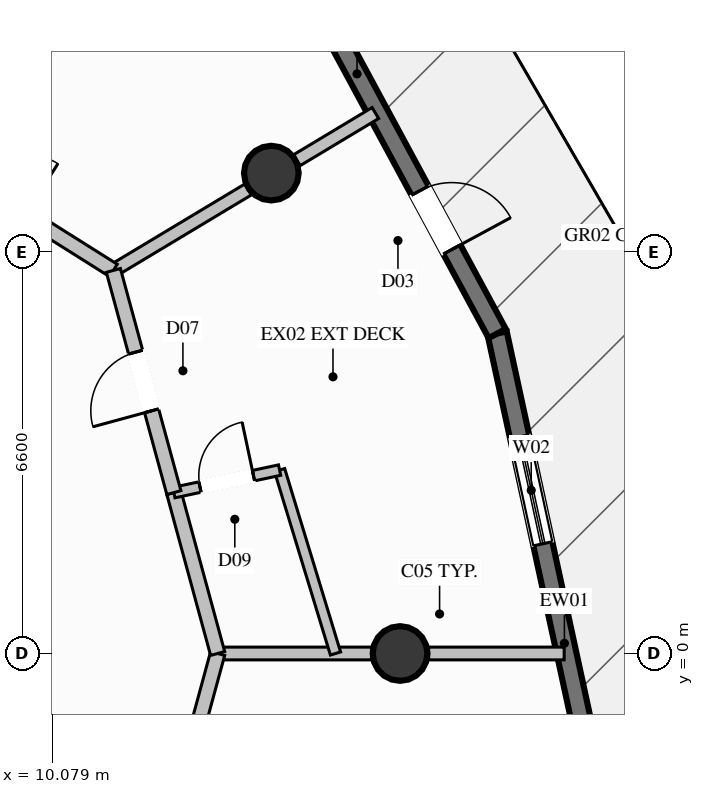
"""IFC4 building model, lengths in metres.
Left out: names, types, materials, properties, quantities, classifications, styles, units other than length and angle.
Written with IfcOpenShell. Run it as: python <this file> out.ifc"""

import sys

from ifc_helpers import new_model, si_unit, direction, frame, frame_2d, origin, origin_2d, place, context, subcontext, project, spatial, rectangle, circle, extrude, element, fill, save


model = new_model("IFC4")
c1 = context("Model", 3, precision=1e-05, world=origin(), true_north=direction((0.0, 1.0)))
c2 = subcontext(c1, "Body", "Model", "MODEL_VIEW")
j1 = project(units=[si_unit("LENGTHUNIT", "METRE"), si_unit("PLANEANGLEUNIT", "RADIAN")], contexts=[c1])
p1 = place(None, origin())
s1 = spatial("IfcSite", under=j1, at=p1, CompositionType="ELEMENT")
p2 = place(p1, origin())
s2 = spatial("IfcBuilding", under=s1, at=p2, CompositionType="ELEMENT")
p3 = place(p2, frame((0.0, 0.0, 180.4)))
s3 = spatial("IfcBuildingStorey", under=s2, at=p3, CompositionType="ELEMENT", Elevation=180.4)
for number, where, z_axis, x_axis in (
    (1, (15.8, 0.0, 0.0), (0.0, 0.0, 1.0), (1.0, 0.0, 0.0)),
    (2, (13.683, 7.9, 0.0), (0.0, 0.0, 1.0), (1.0, 0.0, 0.0)),
):
    element("IfcColumn", number, at=place(p3, frame(where, z_axis=z_axis, x_axis=x_axis)), inside=s3, PredefinedType="COLUMN", context=c2, shape_type="SweptSolid", body=[
        extrude(circle(Radius=0.45, at=origin_2d()), origin(), (0.0, 0.0, 1.0), 3.6),
    ])
p4 = place(p3, frame((17.398, 5.262, 0.0), z_axis=(0.0, 0.0, 1.0), x_axis=(0.211992849193, -0.977271217161, 0.0)))
e3 = element("IfcWall", 3, at=p4, inside=s3, PredefinedType="SOLIDWALL", context=c2, shape_type="SweptSolid", body=[
    extrude(rectangle(XDim=6.637, YDim=0.32, at=frame_2d((3.318, 0.0))), origin(), (0.0, 0.0, 1.0), 3.36),
])
p5 = place(p4, frame((1.738, 0.0, 0.35)))
e4 = element("IfcOpeningElement", 4, at=p5, cuts=e3, PredefinedType="OPENING", context=c2, shape_type="SweptSolid", body=[
    extrude(rectangle(XDim=1.8, YDim=2.6, at=frame_2d((0.9, 1.3))), frame((0.0, 0.17, 0.0), z_axis=(0.0, -1.0, 0.0), x_axis=(1.0, 0.0, 0.0)), (0.0, 0.0, 1.0), 0.34),
])
p6 = place(p3, frame((14.174, 11.232, 0.0), z_axis=(0.0, 0.0, 1.0), x_axis=(0.475159501302, -0.879899680829, 0.0)))
e5 = element("IfcWall", 5, at=p6, inside=s3, PredefinedType="SOLIDWALL", context=c2, shape_type="SweptSolid", body=[
    extrude(rectangle(XDim=6.785, YDim=0.32, at=frame_2d((3.393, 0.0))), origin(), (0.0, 0.0, 1.0), 3.36),
])
p7 = place(p6, frame((4.114, 0.0, 0.0)))
e6 = element("IfcOpeningElement", 6, at=p7, cuts=e5, PredefinedType="OPENING", context=c2, shape_type="SweptSolid", body=[
    extrude(rectangle(XDim=1.1, YDim=2.2, at=frame_2d((0.55, 1.1))), frame((0.0, 0.17, 0.0), z_axis=(0.0, -1.0, 0.0), x_axis=(1.0, 0.0, 0.0)), (0.0, 0.0, 1.0), 0.34),
])
p8 = place(p3, frame((12.8, 0.0, 0.0), z_axis=(0.0, 0.0, 1.0), x_axis=(1.0, 0.0, 0.0)))
e7 = element("IfcWall", 7, at=p8, inside=s3, PredefinedType="PARTITIONING", context=c2, shape_type="SweptSolid", body=[
    extrude(rectangle(XDim=2.53, YDim=0.21, at=frame_2d((1.265, 0.0))), origin(), (0.0, 0.0, 1.0), 3.36),
])
p9 = place(p3, frame((16.27, 0.0, 0.0), z_axis=(0.0, 0.0, 1.0), x_axis=(1.0, 0.0, 0.0)))
e8 = element("IfcWall", 8, at=p9, inside=s3, PredefinedType="PARTITIONING", context=c2, shape_type="SweptSolid", body=[
    extrude(rectangle(XDim=2.229, YDim=0.21, at=frame_2d((1.115, 0.0))), origin(), (0.0, 0.0, 1.0), 3.36),
])
p10 = place(p3, frame((11.085, 6.3, 0.0), z_axis=(0.0, 0.0, 1.0), x_axis=(0.857259301733, 0.514884928497, 0.0)))
e9 = element("IfcWall", 9, at=p10, inside=s3, PredefinedType="PARTITIONING", context=c2, shape_type="SweptSolid", body=[
    extrude(rectangle(XDim=2.583, YDim=0.21, at=frame_2d((1.292, 0.0))), origin(), (0.0, 0.0, 1.0), 2.801),
])
p11 = place(p3, frame((14.102, 8.112, 0.0), z_axis=(0.0, 0.0, 1.0), x_axis=(0.85729274583, 0.514829241543, 0.0)))
e10 = element("IfcWall", 10, at=p11, inside=s3, PredefinedType="PARTITIONING", context=c2, shape_type="SweptSolid", body=[
    extrude(rectangle(XDim=1.507, YDim=0.21, at=frame_2d((0.753, 0.0))), origin(), (0.0, 0.0, 1.0), 3.36),
])
p12 = place(p3, frame((7.35, 8.65, 0.0), z_axis=(0.0, 0.0, 1.0), x_axis=(0.846409267484, -0.532532958526, 0.0)))
e11 = element("IfcWall", 11, at=p12, inside=s3, PredefinedType="PARTITIONING", context=c2, shape_type="SweptSolid", body=[
    extrude(rectangle(XDim=4.413, YDim=0.24, at=frame_2d((2.206, 0.0))), origin(), (0.0, 0.0, 1.0), 3.36),
])
p13 = place(p12, frame((1.706, 0.0, 0.0)))
e12 = element("IfcOpeningElement", 12, at=p13, cuts=e11, PredefinedType="OPENING", context=c2, shape_type="SweptSolid", body=[
    extrude(rectangle(XDim=1.0, YDim=2.2, at=frame_2d((0.5, 1.1))), frame((0.0, 0.13, 0.0), z_axis=(0.0, -1.0, 0.0), x_axis=(1.0, 0.0, 0.0)), (0.0, 0.0, 1.0), 0.26),
])
p14 = place(p3, frame((11.805, -3.654, 0.0), z_axis=(0.0, 0.0, 1.0), x_axis=(0.262762825819, 0.964860454868, 0.0)))
e13 = element("IfcWall", 13, at=p14, inside=s3, PredefinedType="PARTITIONING", context=c2, shape_type="SweptSolid", body=[
    extrude(rectangle(XDim=3.787, YDim=0.24, at=frame_2d((1.894, 0.0))), origin(), (0.0, 0.0, 1.0), 3.36),
])
p15 = place(p14, frame((1.394, 0.0, 0.0)))
e14 = element("IfcOpeningElement", 14, at=p15, cuts=e13, PredefinedType="OPENING", context=c2, shape_type="SweptSolid", body=[
    extrude(rectangle(XDim=1.0, YDim=2.2, at=frame_2d((0.5, 1.1))), frame((0.0, 0.13, 0.0), z_axis=(0.0, -1.0, 0.0), x_axis=(1.0, 0.0, 0.0)), (0.0, 0.0, 1.0), 0.26),
])
p16 = place(p3, frame((12.8, 0.0, 0.0), z_axis=(0.0, 0.0, 1.0), x_axis=(-0.262552356383, 0.964917747872, 0.0)))
e15 = element("IfcWall", 15, at=p16, inside=s3, PredefinedType="PARTITIONING", context=c2, shape_type="SweptSolid", body=[
    extrude(rectangle(XDim=2.742, YDim=0.24, at=frame_2d((1.371, 0.0))), origin(), (0.0, 0.0, 1.0), 3.36),
])
p17 = place(p3, frame((14.738, 0.0, 0.0), z_axis=(0.0, 0.0, 1.0), x_axis=(-0.291451232832, 0.956585688206, 0.0)))
e16 = element("IfcWall", 16, at=p17, inside=s3, PredefinedType="PLUMBINGWALL", context=c2, shape_type="SweptSolid", body=[
    extrude(rectangle(XDim=3.153, YDim=0.175, at=frame_2d((1.577, 0.0))), origin(), (0.0, 0.0, 1.0), 3.36),
])
p18 = place(p3, frame((12.08, 2.646, 0.0), z_axis=(0.0, 0.0, 1.0), x_axis=(0.978092843795, 0.208169135363, 0.0)))
e17 = element("IfcWall", 17, at=p18, inside=s3, PredefinedType="PLUMBINGWALL", context=c2, shape_type="SweptSolid", body=[
    extrude(rectangle(XDim=1.778, YDim=0.175, at=frame_2d((0.889, 0.0))), origin(), (0.0, 0.0, 1.0), 3.36),
])
p19 = place(p18, frame((0.439, 0.0, 0.0)))
e18 = element("IfcOpeningElement", 18, at=p19, cuts=e17, PredefinedType="OPENING", context=c2, shape_type="SweptSolid", body=[
    extrude(rectangle(XDim=0.9, YDim=2.1, at=frame_2d((0.45, 1.05))), frame((0.0, 0.098, 0.0), z_axis=(0.0, -1.0, 0.0), x_axis=(1.0, 0.0, 0.0)), (0.0, 0.0, 1.0), 0.195),
])
p20 = place(p3, frame((12.08, 2.646, 0.0), z_axis=(0.0, 0.0, 1.0), x_axis=(-0.262762825819, 0.964860454868, 0.0)))
e19 = element("IfcWall", 19, at=p20, inside=s3, PredefinedType="PARTITIONING", context=c2, shape_type="SweptSolid", body=[
    extrude(rectangle(XDim=3.787, YDim=0.24, at=frame_2d((1.894, 0.0))), origin(), (0.0, 0.0, 1.0), 3.36),
])
p21 = place(p20, frame((1.394, 0.0, 0.0)))
e20 = element("IfcOpeningElement", 20, at=p21, cuts=e19, PredefinedType="OPENING", context=c2, shape_type="SweptSolid", body=[
    extrude(rectangle(XDim=1.0, YDim=2.2, at=frame_2d((0.5, 1.1))), frame((0.0, 0.13, 0.0), z_axis=(0.0, -1.0, 0.0), x_axis=(1.0, 0.0, 0.0)), (0.0, 0.0, 1.0), 0.26),
])
p22 = place(p5, origin())
e21 = element("IfcWindow", 21, at=p22, inside=s3, PartitioningType="SINGLE_PANEL", PredefinedType="WINDOW", context=c2, shape_type="SweptSolid", body=[
    extrude(rectangle(XDim=1.8, YDim=2.6, at=frame_2d((0.9, 1.3))), frame((0.0, 0.03, 0.0), z_axis=(0.0, -1.0, 0.0), x_axis=(1.0, 0.0, 0.0)), (0.0, 0.0, 1.0), 0.06),
])
fill(e4, e21)
p23 = place(p7, origin())
e22 = element("IfcDoor", 22, at=p23, inside=s3, OperationType="SINGLE_SWING_RIGHT", PredefinedType="DOOR", context=c2, shape_type="SweptSolid", body=[
    extrude(rectangle(XDim=1.1, YDim=2.2, at=frame_2d((0.55, 1.1))), frame((0.0, 0.025, 0.0), z_axis=(0.0, -1.0, 0.0), x_axis=(1.0, 0.0, 0.0)), (0.0, 0.0, 1.0), 0.05),
])
fill(e6, e22)
p24 = place(p19, origin())
e23 = element("IfcDoor", 23, at=p24, inside=s3, OperationType="SINGLE_SWING_RIGHT", PredefinedType="DOOR", context=c2, shape_type="SweptSolid", body=[
    extrude(rectangle(XDim=0.9, YDim=2.1, at=frame_2d((0.45, 1.05))), frame((0.0, 0.025, 0.0), z_axis=(0.0, -1.0, 0.0), x_axis=(1.0, 0.0, 0.0)), (0.0, 0.0, 1.0), 0.05),
])
fill(e18, e23)
p25 = place(p21, origin())
e24 = element("IfcDoor", 24, at=p25, inside=s3, OperationType="SINGLE_SWING_LEFT", PredefinedType="DOOR", context=c2, shape_type="SweptSolid", body=[
    extrude(rectangle(XDim=1.0, YDim=2.2, at=frame_2d((0.5, 1.1))), frame((0.0, 0.025, 0.0), z_axis=(0.0, -1.0, 0.0), x_axis=(1.0, 0.0, 0.0)), (0.0, 0.0, 1.0), 0.05),
])
fill(e20, e24)
save(model, sys.argv[1])
